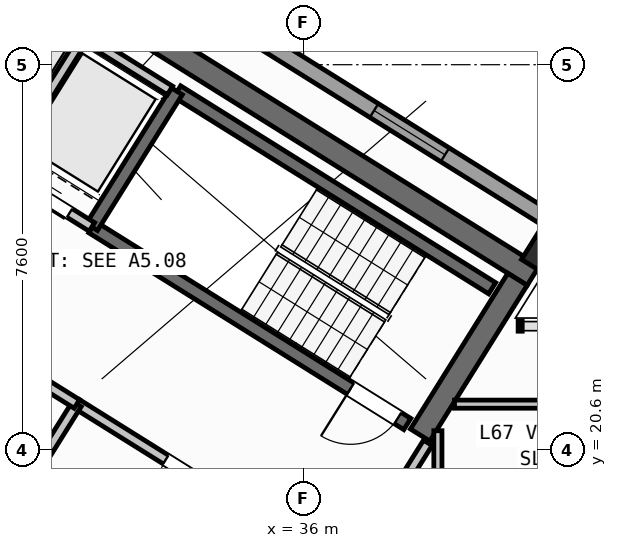
"""IFC4 building model, lengths in metres.
Left out: names, types, materials, properties, quantities, classifications, styles, units other than length and angle.
Written with IfcOpenShell. Run it as: python <this file> out.ifc"""

import sys

from ifc_helpers import new_model, si_unit, direction, frame, frame_2d, origin, origin_2d, place, context, subcontext, project, spatial, rectangle, hollow_rectangle, extrude, source, transform, mapped, element, fill, save


model = new_model("IFC4")
c1 = context("Model", 3, precision=1e-05, world=origin(), true_north=direction((0.0, 1.0)))
c2 = subcontext(c1, "Body", "Model", "MODEL_VIEW")
j1 = project(units=[si_unit("LENGTHUNIT", "METRE"), si_unit("PLANEANGLEUNIT", "RADIAN")], contexts=[c1])
p1 = place(None, origin())
s1 = spatial("IfcSite", under=j1, at=p1, CompositionType="ELEMENT")
p2 = place(p1, origin())
s2 = spatial("IfcBuilding", under=s1, at=p2, CompositionType="ELEMENT")
p3 = place(p2, frame((0.0, 0.0, 266.4)))
s3 = spatial("IfcBuildingStorey", under=s2, at=p3, CompositionType="ELEMENT", Elevation=266.4)
p4 = place(p3, frame((40.531, 24.036, 0.0), z_axis=(0.0, 0.0, 1.0), x_axis=(-0.848048787466, 0.529918157905, 0.0)))
e1 = element("IfcWall", 1, at=p4, inside=s3, PredefinedType="SHEAR", context=c2, shape_type="SweptSolid", body=[
    extrude(rectangle(XDim=13.04, YDim=0.45, at=frame_2d((6.52, 0.0))), origin(), (0.0, 0.0, 1.0), 3.35),
])
p5 = place(p3, frame((40.221, 23.965, 0.0), z_axis=(0.0, 0.0, 1.0), x_axis=(-0.529902075036, -0.848058836916, 0.0)))
e2 = element("IfcWall", 2, at=p5, inside=s3, PredefinedType="SHEAR", context=c2, shape_type="SweptSolid", body=[
    extrude(rectangle(XDim=3.625, YDim=0.45, at=frame_2d((1.812, 0.0))), origin(), (0.0, 0.0, 1.0), 3.35),
])
m1 = source(origin(), c2, "Body", "SweptSolid", [
    extrude(hollow_rectangle(XDim=0.7, YDim=0.7, WallThickness=0.028, at=origin_2d()), origin(), (0.0, 0.0, 1.0), 3.6),
])
p6 = place(p3, frame((40.783, 24.469, 0.0), z_axis=(0.0, 0.0, 1.0), x_axis=(-0.848048096156, 0.529919264233, 0.0)))
e3 = element("IfcColumn", 3, at=p6, inside=s3, PredefinedType="COLUMN", context=c2, shape_type="MappedRepresentation", body=[
    mapped(m1, transform((0.0, 0.0, 0.0), scale=1.0)),
])
p7 = place(p3, frame((14.138, 41.825, 0.0), z_axis=(0.0, 0.0, 1.0), x_axis=(0.848046498049, -0.529921821731, 0.0)))
e4 = element("IfcWall", 4, at=p7, inside=s3, PredefinedType="STANDARD", context=c2, shape_type="SweptSolid", body=[
    extrude(rectangle(XDim=31.588, YDim=0.32, at=frame_2d((15.794, 0.0))), origin(), (0.0, 0.0, 1.0), 3.35),
])
p8 = place(p7, frame((3.46, 0.0, 0.0)))
e5 = element("IfcOpeningElement", 5, at=p8, cuts=e4, PredefinedType="OPENING", context=c2, shape_type="SweptSolid", body=[
    extrude(rectangle(XDim=1.05, YDim=2.15, at=frame_2d((0.525, 1.075))), frame((0.0, 0.17, 0.0), z_axis=(0.0, -1.0, 0.0), x_axis=(1.0, 0.0, 0.0)), (0.0, 0.0, 1.0), 0.34),
])
p9 = place(p7, frame((0.831, 0.0, 1.0)))
e6 = element("IfcOpeningElement", 6, at=p9, cuts=e4, PredefinedType="OPENING", context=c2, shape_type="SweptSolid", body=[
    extrude(rectangle(XDim=0.9, YDim=1.25, at=frame_2d((0.45, 0.625))), frame((0.0, 0.17, 0.0), z_axis=(0.0, -1.0, 0.0), x_axis=(1.0, 0.0, 0.0)), (0.0, 0.0, 1.0), 0.34),
])
p10 = place(p7, frame((8.719, 0.0, 0.9)))
e7 = element("IfcOpeningElement", 7, at=p10, cuts=e4, PredefinedType="OPENING", context=c2, shape_type="SweptSolid", body=[
    extrude(rectangle(XDim=1.35, YDim=1.45, at=frame_2d((0.675, 0.725))), frame((0.0, 0.17, 0.0), z_axis=(0.0, -1.0, 0.0), x_axis=(1.0, 0.0, 0.0)), (0.0, 0.0, 1.0), 0.34),
])
p11 = place(p7, frame((13.599, 0.0, 0.95)))
e8 = element("IfcOpeningElement", 8, at=p11, cuts=e4, PredefinedType="OPENING", context=c2, shape_type="SweptSolid", body=[
    extrude(rectangle(XDim=1.95, YDim=1.35, at=frame_2d((0.975, 0.675))), frame((0.0, 0.17, 0.0), z_axis=(0.0, -1.0, 0.0), x_axis=(1.0, 0.0, 0.0)), (0.0, 0.0, 1.0), 0.34),
])
p12 = place(p7, frame((17.154, 0.0, 1.0)))
e9 = element("IfcOpeningElement", 9, at=p12, cuts=e4, PredefinedType="OPENING", context=c2, shape_type="SweptSolid", body=[
    extrude(rectangle(XDim=0.9, YDim=1.25, at=frame_2d((0.45, 0.625))), frame((0.0, 0.17, 0.0), z_axis=(0.0, -1.0, 0.0), x_axis=(1.0, 0.0, 0.0)), (0.0, 0.0, 1.0), 0.34),
])
p13 = place(p7, frame((21.719, 0.0, 0.9)))
e10 = element("IfcOpeningElement", 10, at=p13, cuts=e4, PredefinedType="OPENING", context=c2, shape_type="SweptSolid", body=[
    extrude(rectangle(XDim=1.65, YDim=1.45, at=frame_2d((0.825, 0.725))), frame((0.0, 0.17, 0.0), z_axis=(0.0, -1.0, 0.0), x_axis=(1.0, 0.0, 0.0)), (0.0, 0.0, 1.0), 0.34),
])
p14 = place(p7, frame((27.419, 0.0, 0.9)))
e11 = element("IfcOpeningElement", 11, at=p14, cuts=e4, PredefinedType="OPENING", context=c2, shape_type="SweptSolid", body=[
    extrude(rectangle(XDim=1.65, YDim=1.45, at=frame_2d((0.825, 0.725))), frame((0.0, 0.17, 0.0), z_axis=(0.0, -1.0, 0.0), x_axis=(1.0, 0.0, 0.0)), (0.0, 0.0, 1.0), 0.34),
])
p15 = place(p3, frame((31.28, 18.261, 0.0), z_axis=(0.0, 0.0, 1.0), x_axis=(-0.848051618787, 0.529913626805, 0.0)))
e12 = element("IfcWall", 12, at=p15, inside=s3, PredefinedType="SHEAR", context=c2, shape_type="SweptSolid", body=[
    extrude(rectangle(XDim=7.46, YDim=0.26, at=frame_2d((3.73, 0.0))), origin(), (0.0, 0.0, 1.0), 3.35),
])
p16 = place(p15, frame((0.36, 0.0, 0.0)))
e13 = element("IfcOpeningElement", 13, at=p16, cuts=e12, PredefinedType="OPENING", context=c2, shape_type="SweptSolid", body=[
    extrude(rectangle(XDim=0.86, YDim=2.05, at=frame_2d((0.43, 1.025))), frame((0.0, 0.14, 0.0), z_axis=(0.0, -1.0, 0.0), x_axis=(1.0, 0.0, 0.0)), (0.0, 0.0, 1.0), 0.28),
])
p17 = place(p3, frame((39.721, 23.788, 0.0), z_axis=(0.0, 0.0, 1.0), x_axis=(-0.848054434086, 0.529909121291, 0.0)))
e14 = element("IfcWall", 14, at=p17, inside=s3, PredefinedType="SHEAR", context=c2, shape_type="SweptSolid", body=[
    extrude(rectangle(XDim=7.33, YDim=0.26, at=frame_2d((3.665, 0.0))), origin(), (0.0, 0.0, 1.0), 3.35),
])
p18 = place(p3, frame((38.046, 21.108, 0.0), z_axis=(0.0, 0.0, 1.0), x_axis=(-0.848054434086, 0.529909121291, 0.0)))
e15 = element("IfcWall", 15, at=p18, inside=s3, PredefinedType="SHEAR", context=c2, shape_type="SweptSolid", body=[
    extrude(rectangle(XDim=7.33, YDim=0.26, at=frame_2d((3.665, 0.0))), origin(), (0.0, 0.0, 1.0), 3.35),
])
p19 = place(p18, frame((0.22, 0.0, 0.0)))
e16 = element("IfcOpeningElement", 16, at=p19, cuts=e15, PredefinedType="OPENING", context=c2, shape_type="SweptSolid", body=[
    extrude(rectangle(XDim=1.1, YDim=2.1, at=frame_2d((0.55, 1.05))), frame((0.0, 0.14, 0.0), z_axis=(0.0, -1.0, 0.0), x_axis=(1.0, 0.0, 0.0)), (0.0, 0.0, 1.0), 0.28),
])
p20 = place(p3, frame((33.496, 27.677, 0.0), z_axis=(0.0, 0.0, 1.0), x_axis=(-0.529908658664, -0.84805472316, 0.0)))
e17 = element("IfcWall", 17, at=p20, inside=s3, PredefinedType="SHEAR", context=c2, shape_type="SweptSolid", body=[
    extrude(rectangle(XDim=3.16, YDim=0.26, at=frame_2d((1.58, 0.0))), origin(), (0.0, 0.0, 1.0), 3.35),
])
p21 = place(p3, frame((36.459, 18.421, 0.0), z_axis=(0.0, 0.0, 1.0), x_axis=(-0.848059591691, 0.529900867089, 0.0)))
e18 = element("IfcWall", 18, at=p21, inside=s3, PredefinedType="STANDARD", context=c2, shape_type="SweptSolid", body=[
    extrude(rectangle(XDim=5.818, YDim=0.2, at=frame_2d((2.909, 0.0))), origin(), (0.0, 0.0, 1.0), 3.34),
])
p22 = place(p21, frame((2.598, 0.0, 0.0)))
e19 = element("IfcOpeningElement", 19, at=p22, cuts=e18, PredefinedType="OPENING", context=c2, shape_type="SweptSolid", body=[
    extrude(rectangle(XDim=1.15, YDim=2.1, at=frame_2d((0.575, 1.05))), frame((0.0, 0.11, 0.0), z_axis=(0.0, -1.0, 0.0), x_axis=(1.0, 0.0, 0.0)), (0.0, 0.0, 1.0), 0.22),
])
p23 = place(p3, frame((31.822, 24.998, 0.0), z_axis=(0.0, 0.0, 1.0), x_axis=(-0.848054125777, 0.529909614701, 0.0)))
e20 = element("IfcWall", 20, at=p23, inside=s3, PredefinedType="STANDARD", context=c2, shape_type="SweptSolid", body=[
    extrude(rectangle(XDim=4.668, YDim=0.2, at=frame_2d((2.334, 0.0))), origin(), (0.0, 0.0, 1.0), 3.34),
])
p24 = place(p23, frame((0.52, 0.0, 0.0)))
e21 = element("IfcOpeningElement", 21, at=p24, cuts=e20, PredefinedType="OPENING", context=c2, shape_type="SweptSolid", body=[
    extrude(rectangle(XDim=1.2, YDim=2.15, at=frame_2d((0.6, 1.075))), frame((0.0, 0.11, 0.0), z_axis=(0.0, -1.0, 0.0), x_axis=(1.0, 0.0, 0.0)), (0.0, 0.0, 1.0), 0.22),
])
p25 = place(p23, frame((2.54, 0.0, 0.0)))
e22 = element("IfcOpeningElement", 22, at=p25, cuts=e20, PredefinedType="OPENING", context=c2, shape_type="SweptSolid", body=[
    extrude(rectangle(XDim=1.2, YDim=2.15, at=frame_2d((0.6, 1.075))), frame((0.0, 0.11, 0.0), z_axis=(0.0, -1.0, 0.0), x_axis=(1.0, 0.0, 0.0)), (0.0, 0.0, 1.0), 0.22),
])
p26 = place(p3, frame((31.645, 28.716, 0.0), z_axis=(0.0, 0.0, 1.0), x_axis=(-0.52986693015, -0.848080795876, 0.0)))
e23 = element("IfcWall", 23, at=p26, inside=s3, PredefinedType="STANDARD", context=c2, shape_type="SweptSolid", body=[
    extrude(rectangle(XDim=2.66, YDim=0.2, at=frame_2d((1.33, 0.0))), origin(), (0.0, 0.0, 1.0), 3.34),
])
p27 = place(p3, frame((33.363, 27.69, 0.0), z_axis=(0.0, 0.0, 1.0), x_axis=(-0.84804957148, 0.529916903215, 0.0)))
e24 = element("IfcWall", 24, at=p27, inside=s3, PredefinedType="STANDARD", context=c2, shape_type="SweptSolid", body=[
    extrude(rectangle(XDim=4.548, YDim=0.2, at=frame_2d((2.274, 0.0))), origin(), (0.0, 0.0, 1.0), 3.34),
])
p28 = place(p3, frame((31.525, 21.504, 0.0), z_axis=(0.0, 0.0, 1.0), x_axis=(-0.529907497854, -0.848055448493, 0.0)))
e25 = element("IfcWall", 25, at=p28, inside=s3, PredefinedType="STANDARD", context=c2, shape_type="SweptSolid", body=[
    extrude(rectangle(XDim=2.88, YDim=0.2, at=frame_2d((1.44, 0.0))), origin(), (0.0, 0.0, 1.0), 3.34),
])
p29 = place(p3, frame((31.525, 21.504, 0.0), z_axis=(0.0, 0.0, 1.0), x_axis=(-0.848042066329, 0.529928913853, 0.0)))
e26 = element("IfcWall", 26, at=p29, inside=s3, PredefinedType="STANDARD", context=c2, shape_type="SweptSolid", body=[
    extrude(rectangle(XDim=6.268, YDim=0.2, at=frame_2d((3.134, 0.0))), origin(), (0.0, 0.0, 1.0), 3.34),
])
p30 = place(p29, frame((4.4, 0.0, 0.0)))
e27 = element("IfcOpeningElement", 27, at=p30, cuts=e26, PredefinedType="OPENING", context=c2, shape_type="SweptSolid", body=[
    extrude(rectangle(XDim=0.86, YDim=2.05, at=frame_2d((0.43, 1.025))), frame((0.0, 0.11, 0.0), z_axis=(0.0, -1.0, 0.0), x_axis=(1.0, 0.0, 0.0)), (0.0, 0.0, 1.0), 0.22),
])
p31 = place(p29, frame((1.45, 0.0, 0.0)))
e28 = element("IfcOpeningElement", 28, at=p31, cuts=e26, PredefinedType="OPENING", context=c2, shape_type="SweptSolid", body=[
    extrude(rectangle(XDim=0.86, YDim=2.05, at=frame_2d((0.43, 1.025))), frame((0.0, 0.11, 0.0), z_axis=(0.0, -1.0, 0.0), x_axis=(1.0, 0.0, 0.0)), (0.0, 0.0, 1.0), 0.22),
])
p32 = place(p3, frame((38.451, 20.737, 0.0), z_axis=(0.0, 0.0, 1.0), x_axis=(-0.529924799939, -0.848044637038, 0.0)))
e29 = element("IfcWall", 29, at=p32, inside=s3, PredefinedType="STANDARD", context=c2, shape_type="SweptSolid", body=[
    extrude(rectangle(XDim=2.96, YDim=0.2, at=frame_2d((1.48, 0.0))), origin(), (0.0, 0.0, 1.0), 3.34),
])
p33 = place(p32, frame((1.46, 0.0, 0.0)))
e30 = element("IfcOpeningElement", 30, at=p33, cuts=e29, PredefinedType="OPENING", context=c2, shape_type="SweptSolid", body=[
    extrude(rectangle(XDim=0.86, YDim=2.05, at=frame_2d((0.43, 1.025))), frame((0.0, 0.11, 0.0), z_axis=(0.0, -1.0, 0.0), x_axis=(1.0, 0.0, 0.0)), (0.0, 0.0, 1.0), 0.22),
])
p34 = place(p3, frame((38.65, 17.93, 0.0), z_axis=(0.0, 0.0, 1.0), x_axis=(0.0, 1.0, 0.0)))
e31 = element("IfcWall", 31, at=p34, inside=s3, PredefinedType="PARTITIONING", context=c2, shape_type="SweptSolid", body=[
    extrude(rectangle(XDim=3.046, YDim=0.16, at=frame_2d((1.523, 0.0))), origin(), (0.0, 0.0, 1.0), 3.34),
])
p35 = place(p3, frame((38.978, 21.5, 0.0), z_axis=(0.0, 0.0, 1.0), x_axis=(1.0, 0.0, 0.0)))
e32 = element("IfcWall", 32, at=p35, inside=s3, PredefinedType="PARTITIONING", context=c2, shape_type="SweptSolid", body=[
    extrude(rectangle(XDim=3.823, YDim=0.16, at=frame_2d((1.911, 0.0))), origin(), (0.0, 0.0, 1.0), 3.34),
])
m2 = source(origin(), c2, "Body", "SweptSolid", [
    extrude(rectangle(XDim=1.65, YDim=1.45, at=frame_2d((0.825, 0.725))), frame((0.0, 0.03, 0.0), z_axis=(0.0, -1.0, 0.0), x_axis=(1.0, 0.0, 0.0)), (0.0, 0.0, 1.0), 0.06),
])
p36 = place(p14, origin())
e33 = element("IfcWindow", 33, at=p36, inside=s3, PartitioningType="SINGLE_PANEL", PredefinedType="WINDOW", context=c2, shape_type="MappedRepresentation", body=[
    mapped(m2, transform((0.0, 0.0, 0.0), scale=1.0)),
])
fill(e11, e33)
m3 = source(origin(), c2, "Body", "SweptSolid", [
    extrude(rectangle(XDim=1.1, YDim=2.1, at=frame_2d((0.55, 1.05))), frame((0.0, 0.025, 0.0), z_axis=(0.0, -1.0, 0.0), x_axis=(1.0, 0.0, 0.0)), (0.0, 0.0, 1.0), 0.05),
])
p37 = place(p19, origin())
e34 = element("IfcDoor", 34, at=p37, inside=s3, OperationType="SINGLE_SWING_RIGHT", PredefinedType="DOOR", context=c2, shape_type="MappedRepresentation", body=[
    mapped(m3, transform((0.0, 0.0, 0.0), scale=1.0)),
])
fill(e16, e34)
m4 = source(origin(), c2, "Body", "SweptSolid", [
    extrude(rectangle(XDim=1.15, YDim=2.1, at=frame_2d((0.575, 1.05))), frame((0.0, 0.025, 0.0), z_axis=(0.0, -1.0, 0.0), x_axis=(1.0, 0.0, 0.0)), (0.0, 0.0, 1.0), 0.05),
])
p38 = place(p22, origin())
e35 = element("IfcDoor", 35, at=p38, inside=s3, OperationType="SINGLE_SWING_LEFT", PredefinedType="DOOR", context=c2, shape_type="MappedRepresentation", body=[
    mapped(m4, transform((0.0, 0.0, 0.0), scale=1.0)),
])
fill(e19, e35)
m5 = source(origin(), c2, "Body", "SweptSolid", [
    extrude(rectangle(XDim=1.2, YDim=2.15, at=frame_2d((0.6, 1.075))), frame((0.0, 0.025, 0.0), z_axis=(0.0, -1.0, 0.0), x_axis=(1.0, 0.0, 0.0)), (0.0, 0.0, 1.0), 0.05),
])
p39 = place(p24, origin())
e36 = element("IfcDoor", 36, at=p39, inside=s3, OperationType="DOUBLE_DOOR_SLIDING", PredefinedType="DOOR", context=c2, shape_type="MappedRepresentation", body=[
    mapped(m5, transform((0.0, 0.0, 0.0), scale=1.0)),
])
fill(e21, e36)
save(model, sys.argv[1])
